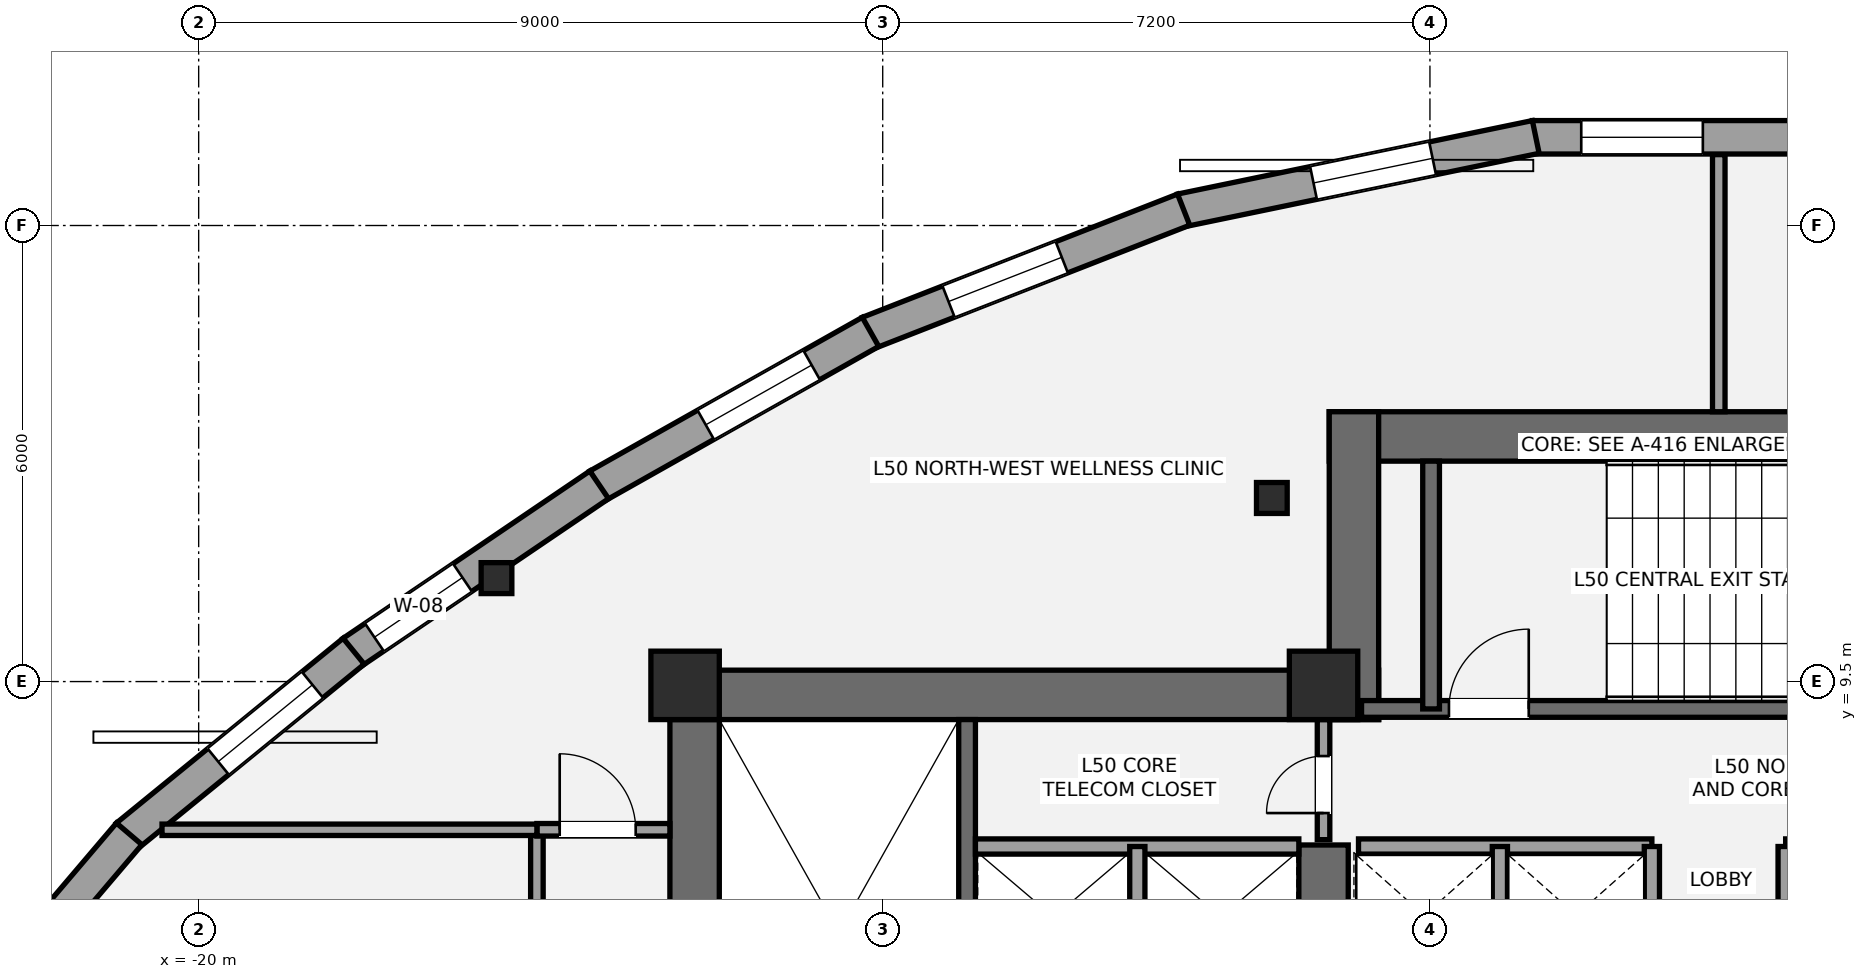
"""IFC4 building model, lengths in metres.
Left out: names, types, materials, properties, quantities, classifications, styles, units other than length and angle.
Written with IfcOpenShell. Run it as: python <this file> out.ifc"""

import sys

from ifc_helpers import new_model, si_unit, direction, frame, frame_2d, origin, origin_2d, place, context, subcontext, project, spatial, rectangle, i_section, extrude, element, fill, save


model = new_model("IFC4")
c1 = context("Model", 3, precision=1e-05, world=origin(), true_north=direction((0.0, 1.0)))
c2 = subcontext(c1, "Body", "Model", "MODEL_VIEW")
j1 = project(units=[si_unit("LENGTHUNIT", "METRE"), si_unit("PLANEANGLEUNIT", "RADIAN")], contexts=[c1])
p1 = place(None, origin())
s1 = spatial("IfcSite", under=j1, at=p1, CompositionType="ELEMENT")
p2 = place(p1, origin())
s2 = spatial("IfcBuilding", under=s1, at=p2, CompositionType="ELEMENT")
p3 = place(p2, frame((0.0, 0.0, 182.2)))
s3 = spatial("IfcBuildingStorey", under=s2, at=p3, CompositionType="ELEMENT", Elevation=182.2)
p4 = place(p3, frame((-13.475, 1.2, 0.0), z_axis=(0.0, 0.0, 1.0), x_axis=(0.0, 1.0, 0.0)))
e1 = element("IfcWall", 1, at=p4, inside=s3, PredefinedType="SHEAR", context=c2, shape_type="SweptSolid", body=[
    extrude(rectangle(XDim=8.45, YDim=0.65, at=frame_2d((4.225, 0.0))), origin(), (0.0, 0.0, 1.0), 3.2),
])
p5 = place(p3, frame((-13.8, 9.325, 0.0), z_axis=(0.0, 0.0, 1.0), x_axis=(1.0, 0.0, 0.0)))
e2 = element("IfcWall", 2, at=p5, inside=s3, PredefinedType="SHEAR", context=c2, shape_type="SweptSolid", body=[
    extrude(rectangle(XDim=9.325, YDim=0.65, at=frame_2d((4.663, 0.0))), origin(), (0.0, 0.0, 1.0), 3.2),
])
p6 = place(p3, frame((-5.2, 5.35, 0.0), z_axis=(0.0, 0.0, 1.0), x_axis=(0.0, 1.0, 0.0)))
e3 = element("IfcWall", 3, at=p6, inside=s3, PredefinedType="SHEAR", context=c2, shape_type="SweptSolid", body=[
    extrude(rectangle(XDim=2.0, YDim=0.65, at=frame_2d((1.0, 0.0))), origin(), (0.0, 0.0, 1.0), 3.2),
])
p7 = place(p3, frame((-9.89, 1.85, 0.0), z_axis=(0.0, 0.0, 1.0), x_axis=(0.0, 1.0, 0.0)))
e4 = element("IfcWall", 4, at=p7, inside=s3, PredefinedType="SHEAR", context=c2, shape_type="SweptSolid", body=[
    extrude(rectangle(XDim=7.15, YDim=0.22, at=frame_2d((3.575, 0.0))), origin(), (0.0, 0.0, 1.0), 3.2),
])
p8 = place(p3, frame((-5.125, 12.725, 0.0), z_axis=(0.0, 0.0, 1.0), x_axis=(1.0, 0.0, 0.0)))
e5 = element("IfcWall", 5, at=p8, inside=s3, PredefinedType="SHEAR", context=c2, shape_type="SweptSolid", body=[
    extrude(rectangle(XDim=10.25, YDim=0.65, at=frame_2d((5.125, 0.0))), origin(), (0.0, 0.0, 1.0), 3.2),
])
p9 = place(p3, frame((-4.8, 9.0, 0.0), z_axis=(0.0, 0.0, 1.0), x_axis=(0.0, 1.0, 0.0)))
e6 = element("IfcWall", 6, at=p9, inside=s3, PredefinedType="SHEAR", context=c2, shape_type="SweptSolid", body=[
    extrude(rectangle(XDim=4.05, YDim=0.65, at=frame_2d((2.025, 0.0))), origin(), (0.0, 0.0, 1.0), 3.2),
])
p10 = place(p3, frame((-4.7, 9.14, 0.0), z_axis=(0.0, 0.0, 1.0), x_axis=(1.0, 0.0, 0.0)))
e7 = element("IfcWall", 7, at=p10, inside=s3, PredefinedType="SHEAR", context=c2, shape_type="SweptSolid", body=[
    extrude(rectangle(XDim=9.3, YDim=0.22, at=frame_2d((4.65, 0.0))), origin(), (0.0, 0.0, 1.0), 3.2),
])
p11 = place(p10, frame((1.15, 0.0, 0.0)))
e8 = element("IfcOpeningElement", 8, at=p11, cuts=e7, PredefinedType="OPENING", context=c2, shape_type="SweptSolid", body=[
    extrude(rectangle(XDim=1.05, YDim=2.15, at=frame_2d((0.525, 1.075))), frame((0.0, 0.12, 0.0), z_axis=(0.0, -1.0, 0.0), x_axis=(1.0, 0.0, 0.0)), (0.0, 0.0, 1.0), 0.24),
])
p12 = place(p3, frame((-3.785, 9.14, 0.0), z_axis=(0.0, 0.0, 1.0), x_axis=(0.0, 1.0, 0.0)))
e9 = element("IfcWall", 9, at=p12, inside=s3, PredefinedType="SHEAR", context=c2, shape_type="SweptSolid", body=[
    extrude(rectangle(XDim=3.26, YDim=0.22, at=frame_2d((1.63, 0.0))), origin(), (0.0, 0.0, 1.0), 3.2),
])
for number, where, z_axis, x_axis in (
    (10, (-13.6, 9.45, 0.0), (0.0, 0.0, 1.0), (1.0, 0.0, 0.0)),
    (11, (-5.2, 9.45, 0.0), (0.0, 0.0, 1.0), (1.0, 0.0, 0.0)),
):
    element("IfcColumn", number, at=place(p3, frame(where, z_axis=z_axis, x_axis=x_axis)), inside=s3, PredefinedType="COLUMN", context=c2, shape_type="SweptSolid", body=[
        extrude(rectangle(XDim=0.9, YDim=0.9, at=origin_2d()), origin(), (0.0, 0.0, 1.0), 3.2),
    ])
for number, where, z_axis, x_axis in (
    (12, (-5.88, 11.915, 0.0), (0.0, 0.0, 1.0), (1.0, 0.0, 0.0)),
    (13, (-16.082, 10.861, 0.0), (0.0, 0.0, 1.0), (1.0, 0.0, 0.0)),
):
    element("IfcColumn", number, at=place(p3, frame(where, z_axis=z_axis, x_axis=x_axis)), inside=s3, PredefinedType="COLUMN", context=c2, shape_type="SweptSolid", body=[
        extrude(i_section(OverallWidth=0.404, OverallDepth=0.407, WebThickness=0.027, FlangeThickness=0.044, at=origin_2d()), origin(), (0.0, 0.0, 1.0), 3.2),
    ])
p13 = place(p3, frame((-2.452, 16.66, 0.0), z_axis=(0.0, 0.0, 1.0), x_axis=(1.0, 0.0, 0.0)))
e14 = element("IfcWall", 14, at=p13, inside=s3, PredefinedType="STANDARD", context=c2, shape_type="SweptSolid", body=[
    extrude(rectangle(XDim=4.905, YDim=0.44, at=frame_2d((2.452, 0.0))), origin(), (0.0, 0.0, 1.0), 2.315),
])
p14 = place(p13, frame((0.643, 0.0, 0.58)))
e15 = element("IfcOpeningElement", 15, at=p14, cuts=e14, PredefinedType="OPENING", context=c2, shape_type="SweptSolid", body=[
    extrude(rectangle(XDim=1.6, YDim=1.55, at=frame_2d((0.8, 0.775))), frame((0.0, 0.23, 0.0), z_axis=(0.0, -1.0, 0.0), x_axis=(1.0, 0.0, 0.0)), (0.0, 0.0, 1.0), 0.46),
])
p15 = place(p3, frame((-7.076, 15.698, 0.0), z_axis=(0.0, 0.0, 1.0), x_axis=(0.979222564836, 0.202788482206, 0.0)))
e16 = element("IfcWall", 16, at=p15, inside=s3, PredefinedType="STANDARD", context=c2, shape_type="SweptSolid", body=[
    extrude(rectangle(XDim=4.768, YDim=0.44, at=frame_2d((2.384, 0.0))), origin(), (0.0, 0.0, 1.0), 2.315),
])
p16 = place(p15, frame((1.781, 0.0, 0.58)))
e17 = element("IfcOpeningElement", 17, at=p16, cuts=e16, PredefinedType="OPENING", context=c2, shape_type="SweptSolid", body=[
    extrude(rectangle(XDim=1.6, YDim=1.55, at=frame_2d((0.8, 0.775))), frame((0.0, 0.23, 0.0), z_axis=(0.0, -1.0, 0.0), x_axis=(1.0, 0.0, 0.0)), (0.0, 0.0, 1.0), 0.46),
])
p17 = place(p3, frame((-11.188, 14.087, 0.0), z_axis=(0.0, 0.0, 1.0), x_axis=(0.93133333838, 0.364167836062, 0.0)))
e18 = element("IfcWall", 18, at=p17, inside=s3, PredefinedType="STANDARD", context=c2, shape_type="SweptSolid", body=[
    extrude(rectangle(XDim=4.454, YDim=0.44, at=frame_2d((2.227, 0.0))), origin(), (0.0, 0.0, 1.0), 2.315),
])
p18 = place(p17, frame((1.132, 0.0, 0.58)))
e19 = element("IfcOpeningElement", 19, at=p18, cuts=e18, PredefinedType="OPENING", context=c2, shape_type="SweptSolid", body=[
    extrude(rectangle(XDim=1.6, YDim=1.55, at=frame_2d((0.8, 0.775))), frame((0.0, 0.23, 0.0), z_axis=(0.0, -1.0, 0.0), x_axis=(1.0, 0.0, 0.0)), (0.0, 0.0, 1.0), 0.46),
])
p19 = place(p3, frame((-14.746, 12.078, 0.0), z_axis=(0.0, 0.0, 1.0), x_axis=(0.871039635509, 0.491212737388, 0.0)))
e20 = element("IfcWall", 20, at=p19, inside=s3, PredefinedType="STANDARD", context=c2, shape_type="SweptSolid", body=[
    extrude(rectangle(XDim=4.116, YDim=0.44, at=frame_2d((2.058, 0.0))), origin(), (0.0, 0.0, 1.0), 2.315),
])
p20 = place(p19, frame((1.627, 0.0, 0.58)))
e21 = element("IfcOpeningElement", 21, at=p20, cuts=e20, PredefinedType="OPENING", context=c2, shape_type="SweptSolid", body=[
    extrude(rectangle(XDim=1.6, YDim=1.55, at=frame_2d((0.8, 0.775))), frame((0.0, 0.23, 0.0), z_axis=(0.0, -1.0, 0.0), x_axis=(1.0, 0.0, 0.0)), (0.0, 0.0, 1.0), 0.46),
])
p21 = place(p3, frame((-17.976, 9.888, 0.0), z_axis=(0.0, 0.0, 1.0), x_axis=(0.827733986143, 0.561120707321, 0.0)))
e22 = element("IfcWall", 22, at=p21, inside=s3, PredefinedType="STANDARD", context=c2, shape_type="SweptSolid", body=[
    extrude(rectangle(XDim=3.921, YDim=0.44, at=frame_2d((1.96, 0.0))), origin(), (0.0, 0.0, 1.0), 2.315),
])
p22 = place(p21, frame((0.348, 0.0, 0.58)))
e23 = element("IfcOpeningElement", 23, at=p22, cuts=e22, PredefinedType="OPENING", context=c2, shape_type="SweptSolid", body=[
    extrude(rectangle(XDim=1.4, YDim=1.55, at=frame_2d((0.7, 0.775))), frame((0.0, 0.23, 0.0), z_axis=(0.0, -1.0, 0.0), x_axis=(1.0, 0.0, 0.0)), (0.0, 0.0, 1.0), 0.46),
])
p23 = place(p3, frame((-20.943, 7.469, 0.0), z_axis=(0.0, 0.0, 1.0), x_axis=(0.77522232587, 0.631688487684, 0.0)))
e24 = element("IfcWall", 24, at=p23, inside=s3, PredefinedType="STANDARD", context=c2, shape_type="SweptSolid", body=[
    extrude(rectangle(XDim=3.847, YDim=0.44, at=frame_2d((1.924, 0.0))), origin(), (0.0, 0.0, 1.0), 2.315),
])
p24 = place(p23, frame((1.548, 0.0, 0.58)))
e25 = element("IfcOpeningElement", 25, at=p24, cuts=e24, PredefinedType="OPENING", context=c2, shape_type="SweptSolid", body=[
    extrude(rectangle(XDim=1.6, YDim=1.55, at=frame_2d((0.8, 0.775))), frame((0.0, 0.23, 0.0), z_axis=(0.0, -1.0, 0.0), x_axis=(1.0, 0.0, 0.0)), (0.0, 0.0, 1.0), 0.46),
])
p25 = place(p3, frame((-23.307, 4.685, 0.0), z_axis=(0.0, 0.0, 1.0), x_axis=(0.648014991522, 0.761627580096, 0.0)))
e26 = element("IfcWall", 26, at=p25, inside=s3, PredefinedType="STANDARD", context=c2, shape_type="SweptSolid", body=[
    extrude(rectangle(XDim=3.692, YDim=0.44, at=frame_2d((1.846, 0.0))), origin(), (0.0, 0.0, 1.0), 2.315),
])
p26 = place(p25, frame((0.598, 0.0, 0.58)))
e27 = element("IfcOpeningElement", 27, at=p26, cuts=e26, PredefinedType="OPENING", context=c2, shape_type="SweptSolid", body=[
    extrude(rectangle(XDim=1.6, YDim=1.55, at=frame_2d((0.8, 0.775))), frame((0.0, 0.23, 0.0), z_axis=(0.0, -1.0, 0.0), x_axis=(1.0, 0.0, 0.0)), (0.0, 0.0, 1.0), 0.46),
])
p27 = place(p3, frame((-9.78, 7.33, 0.0), z_axis=(0.0, 0.0, 1.0), x_axis=(1.0, 0.0, 0.0)))
e28 = element("IfcWall", 28, at=p27, inside=s3, PredefinedType="SOLIDWALL", context=c2, shape_type="SweptSolid", body=[
    extrude(rectangle(XDim=4.255, YDim=0.2, at=frame_2d((2.127, 0.0))), origin(), (0.0, 0.0, 1.0), 3.02),
])
p28 = place(p3, frame((-7.65, 5.47, 0.0), z_axis=(0.0, 0.0, 1.0), x_axis=(0.0, 1.0, 0.0)))
e29 = element("IfcWall", 29, at=p28, inside=s3, PredefinedType="SOLIDWALL", context=c2, shape_type="SweptSolid", body=[
    extrude(rectangle(XDim=1.86, YDim=0.2, at=frame_2d((0.93, 0.0))), origin(), (0.0, 0.0, 1.0), 3.02),
])
for number, where, z_axis, x_axis in (
    (30, (-4.74, 7.33, 0.0), (0.0, 0.0, 1.0), (1.0, 0.0, 0.0)),
    (31, (0.88, 7.33, 0.0), (0.0, 0.0, 1.0), (1.0, 0.0, 0.0)),
):
    element("IfcWall", number, at=place(p3, frame(where, z_axis=z_axis, x_axis=x_axis)), inside=s3, PredefinedType="SOLIDWALL", context=c2, shape_type="SweptSolid", body=[
        extrude(rectangle(XDim=3.86, YDim=0.2, at=frame_2d((1.93, 0.0))), origin(), (0.0, 0.0, 1.0), 3.02),
    ])
for number, where, z_axis, x_axis in (
    (32, (-2.88, 5.52, 0.0), (0.0, 0.0, 1.0), (0.0, 1.0, 0.0)),
    (33, (-0.88, 5.52, 0.0), (0.0, 0.0, 1.0), (0.0, 1.0, 0.0)),
    (34, (0.88, 5.52, 0.0), (0.0, 0.0, 1.0), (0.0, 1.0, 0.0)),
):
    element("IfcWall", number, at=place(p3, frame(where, z_axis=z_axis, x_axis=x_axis)), inside=s3, PredefinedType="SOLIDWALL", context=c2, shape_type="SweptSolid", body=[
        extrude(rectangle(XDim=1.81, YDim=0.2, at=frame_2d((0.905, 0.0))), origin(), (0.0, 0.0, 1.0), 3.02),
    ])
p29 = place(p3, frame((-5.2, 7.42, 0.0), z_axis=(0.0, 0.0, 1.0), x_axis=(0.0, 1.0, 0.0)))
e35 = element("IfcWall", 35, at=p29, inside=s3, PredefinedType="PARTITIONING", context=c2, shape_type="SweptSolid", body=[
    extrude(rectangle(XDim=1.58, YDim=0.165, at=frame_2d((0.79, 0.0))), origin(), (0.0, 0.0, 1.0), 3.02),
])
p30 = place(p29, frame((0.35, 0.0, 0.0)))
e36 = element("IfcOpeningElement", 36, at=p30, cuts=e35, PredefinedType="OPENING", context=c2, shape_type="SweptSolid", body=[
    extrude(rectangle(XDim=0.75, YDim=2.1, at=frame_2d((0.375, 1.05))), frame((0.0, 0.093, 0.0), z_axis=(0.0, -1.0, 0.0), x_axis=(1.0, 0.0, 0.0)), (0.0, 0.0, 1.0), 0.185),
])
p31 = place(p3, frame((-15.55, -11.257, 0.0), z_axis=(0.0, 0.0, 1.0), x_axis=(0.0, 1.0, 0.0)))
e37 = element("IfcWall", 37, at=p31, inside=s3, PredefinedType="PARTITIONING", context=c2, shape_type="SweptSolid", body=[
    extrude(rectangle(XDim=18.807, YDim=0.165, at=frame_2d((9.403, 0.0))), origin(), (0.0, 0.0, 1.0), 2.473),
])
p32 = place(p31, frame((4.106, 0.0, 0.0)))
e38 = element("IfcOpeningElement", 38, at=p32, cuts=e37, PredefinedType="OPENING", context=c2, shape_type="SweptSolid", body=[
    extrude(rectangle(XDim=0.85, YDim=2.1, at=frame_2d((0.425, 1.05))), frame((0.0, 0.093, 0.0), z_axis=(0.0, -1.0, 0.0), x_axis=(1.0, 0.0, 0.0)), (0.0, 0.0, 1.0), 0.185),
])
p33 = place(p31, frame((7.257, 0.0, 0.0)))
e39 = element("IfcOpeningElement", 39, at=p33, cuts=e37, PredefinedType="OPENING", context=c2, shape_type="SweptSolid", body=[
    extrude(rectangle(XDim=1.0, YDim=2.15, at=frame_2d((0.5, 1.075))), frame((0.0, 0.093, 0.0), z_axis=(0.0, -1.0, 0.0), x_axis=(1.0, 0.0, 0.0)), (0.0, 0.0, 1.0), 0.185),
])
p34 = place(p31, frame((11.656, 0.0, 0.0)))
e40 = element("IfcOpeningElement", 40, at=p34, cuts=e37, PredefinedType="OPENING", context=c2, shape_type="SweptSolid", body=[
    extrude(rectangle(XDim=1.0, YDim=2.15, at=frame_2d((0.5, 1.075))), frame((0.0, 0.093, 0.0), z_axis=(0.0, -1.0, 0.0), x_axis=(1.0, 0.0, 0.0)), (0.0, 0.0, 1.0), 0.185),
])
p35 = place(p31, frame((16.031, 0.0, 0.0)))
e41 = element("IfcOpeningElement", 41, at=p35, cuts=e37, PredefinedType="OPENING", context=c2, shape_type="SweptSolid", body=[
    extrude(rectangle(XDim=1.0, YDim=2.15, at=frame_2d((0.5, 1.075))), frame((0.0, 0.093, 0.0), z_axis=(0.0, -1.0, 0.0), x_axis=(1.0, 0.0, 0.0)), (0.0, 0.0, 1.0), 0.185),
])
p36 = place(p3, frame((-15.55, 7.55, 0.0), z_axis=(0.0, 0.0, 1.0), x_axis=(1.0, 0.0, 0.0)))
e42 = element("IfcWall", 42, at=p36, inside=s3, PredefinedType="PARTITIONING", context=c2, shape_type="SweptSolid", body=[
    extrude(rectangle(XDim=1.75, YDim=0.165, at=frame_2d((0.875, 0.0))), origin(), (0.0, 0.0, 1.0), 3.02),
])
p37 = place(p36, frame((0.3, 0.0, 0.0)))
e43 = element("IfcOpeningElement", 43, at=p37, cuts=e42, PredefinedType="OPENING", context=c2, shape_type="SweptSolid", body=[
    extrude(rectangle(XDim=1.0, YDim=2.15, at=frame_2d((0.5, 1.075))), frame((0.0, 0.093, 0.0), z_axis=(0.0, -1.0, 0.0), x_axis=(1.0, 0.0, 0.0)), (0.0, 0.0, 1.0), 0.185),
])
p38 = place(p3, frame((-20.482, 7.55, 0.0), z_axis=(0.0, 0.0, 1.0), x_axis=(1.0, 0.0, 0.0)))
e44 = element("IfcWall", 44, at=p38, inside=s3, PredefinedType="PLUMBINGWALL", context=c2, shape_type="SweptSolid", body=[
    extrude(rectangle(XDim=4.932, YDim=0.15, at=frame_2d((2.466, 0.0))), origin(), (0.0, 0.0, 1.0), 2.473),
])
p39 = place(p3, frame((0.0, 13.05, 0.0), z_axis=(0.0, 0.0, 1.0), x_axis=(0.0, 1.0, 0.0)))
e45 = element("IfcWall", 45, at=p39, inside=s3, PredefinedType="PARTITIONING", context=c2, shape_type="SweptSolid", body=[
    extrude(rectangle(XDim=3.383, YDim=0.165, at=frame_2d((1.691, 0.0))), origin(), (0.0, 0.0, 1.0), 3.02),
])
p40 = place(p14, origin())
e46 = element("IfcWindow", 46, at=p40, inside=s3, PartitioningType="SINGLE_PANEL", PredefinedType="WINDOW", context=c2, shape_type="SweptSolid", body=[
    extrude(rectangle(XDim=1.6, YDim=1.55, at=frame_2d((0.8, 0.775))), frame((0.0, -0.01, 0.0), z_axis=(0.0, -1.0, 0.0), x_axis=(1.0, 0.0, 0.0)), (0.0, 0.0, 1.0), 0.06),
])
fill(e15, e46)
p41 = place(p16, origin())
e47 = element("IfcWindow", 47, at=p41, inside=s3, PartitioningType="SINGLE_PANEL", PredefinedType="WINDOW", context=c2, shape_type="SweptSolid", body=[
    extrude(rectangle(XDim=1.6, YDim=1.55, at=frame_2d((0.8, 0.775))), frame((0.0, -0.01, 0.0), z_axis=(0.0, -1.0, 0.0), x_axis=(1.0, 0.0, 0.0)), (0.0, 0.0, 1.0), 0.06),
])
fill(e17, e47)
p42 = place(p18, origin())
e48 = element("IfcWindow", 48, at=p42, inside=s3, PartitioningType="SINGLE_PANEL", PredefinedType="WINDOW", context=c2, shape_type="SweptSolid", body=[
    extrude(rectangle(XDim=1.6, YDim=1.55, at=frame_2d((0.8, 0.775))), frame((0.0, -0.01, 0.0), z_axis=(0.0, -1.0, 0.0), x_axis=(1.0, 0.0, 0.0)), (0.0, 0.0, 1.0), 0.06),
])
fill(e19, e48)
p43 = place(p20, origin())
e49 = element("IfcWindow", 49, at=p43, inside=s3, PartitioningType="SINGLE_PANEL", PredefinedType="WINDOW", context=c2, shape_type="SweptSolid", body=[
    extrude(rectangle(XDim=1.6, YDim=1.55, at=frame_2d((0.8, 0.775))), frame((0.0, -0.01, 0.0), z_axis=(0.0, -1.0, 0.0), x_axis=(1.0, 0.0, 0.0)), (0.0, 0.0, 1.0), 0.06),
])
fill(e21, e49)
p44 = place(p22, origin())
e50 = element("IfcWindow", 50, at=p44, inside=s3, PartitioningType="SINGLE_PANEL", PredefinedType="WINDOW", context=c2, shape_type="SweptSolid", body=[
    extrude(rectangle(XDim=1.4, YDim=1.55, at=frame_2d((0.7, 0.775))), frame((0.0, -0.01, 0.0), z_axis=(0.0, -1.0, 0.0), x_axis=(1.0, 0.0, 0.0)), (0.0, 0.0, 1.0), 0.06),
])
fill(e23, e50)
p45 = place(p24, origin())
e51 = element("IfcWindow", 51, at=p45, inside=s3, PartitioningType="SINGLE_PANEL", PredefinedType="WINDOW", context=c2, shape_type="SweptSolid", body=[
    extrude(rectangle(XDim=1.6, YDim=1.55, at=frame_2d((0.8, 0.775))), frame((0.0, -0.01, 0.0), z_axis=(0.0, -1.0, 0.0), x_axis=(1.0, 0.0, 0.0)), (0.0, 0.0, 1.0), 0.06),
])
fill(e25, e51)
p46 = place(p11, origin())
e52 = element("IfcDoor", 52, at=p46, inside=s3, OperationType="SINGLE_SWING_RIGHT", PredefinedType="DOOR", context=c2, shape_type="SweptSolid", body=[
    extrude(rectangle(XDim=1.05, YDim=2.15, at=frame_2d((0.525, 1.075))), frame((0.0, 0.025, 0.0), z_axis=(0.0, -1.0, 0.0), x_axis=(1.0, 0.0, 0.0)), (0.0, 0.0, 1.0), 0.05),
])
fill(e8, e52)
p47 = place(p30, origin())
e53 = element("IfcDoor", 53, at=p47, inside=s3, OperationType="SINGLE_SWING_LEFT", PredefinedType="DOOR", context=c2, shape_type="SweptSolid", body=[
    extrude(rectangle(XDim=0.75, YDim=2.1, at=frame_2d((0.375, 1.05))), frame((0.0, 0.025, 0.0), z_axis=(0.0, -1.0, 0.0), x_axis=(1.0, 0.0, 0.0)), (0.0, 0.0, 1.0), 0.05),
])
fill(e36, e53)
p48 = place(p37, origin())
e54 = element("IfcDoor", 54, at=p48, inside=s3, OperationType="SINGLE_SWING_LEFT", PredefinedType="DOOR", context=c2, shape_type="SweptSolid", body=[
    extrude(rectangle(XDim=1.0, YDim=2.15, at=frame_2d((0.5, 1.075))), frame((0.0, 0.025, 0.0), z_axis=(0.0, -1.0, 0.0), x_axis=(1.0, 0.0, 0.0)), (0.0, 0.0, 1.0), 0.05),
])
fill(e43, e54)
save(model, sys.argv[1])
